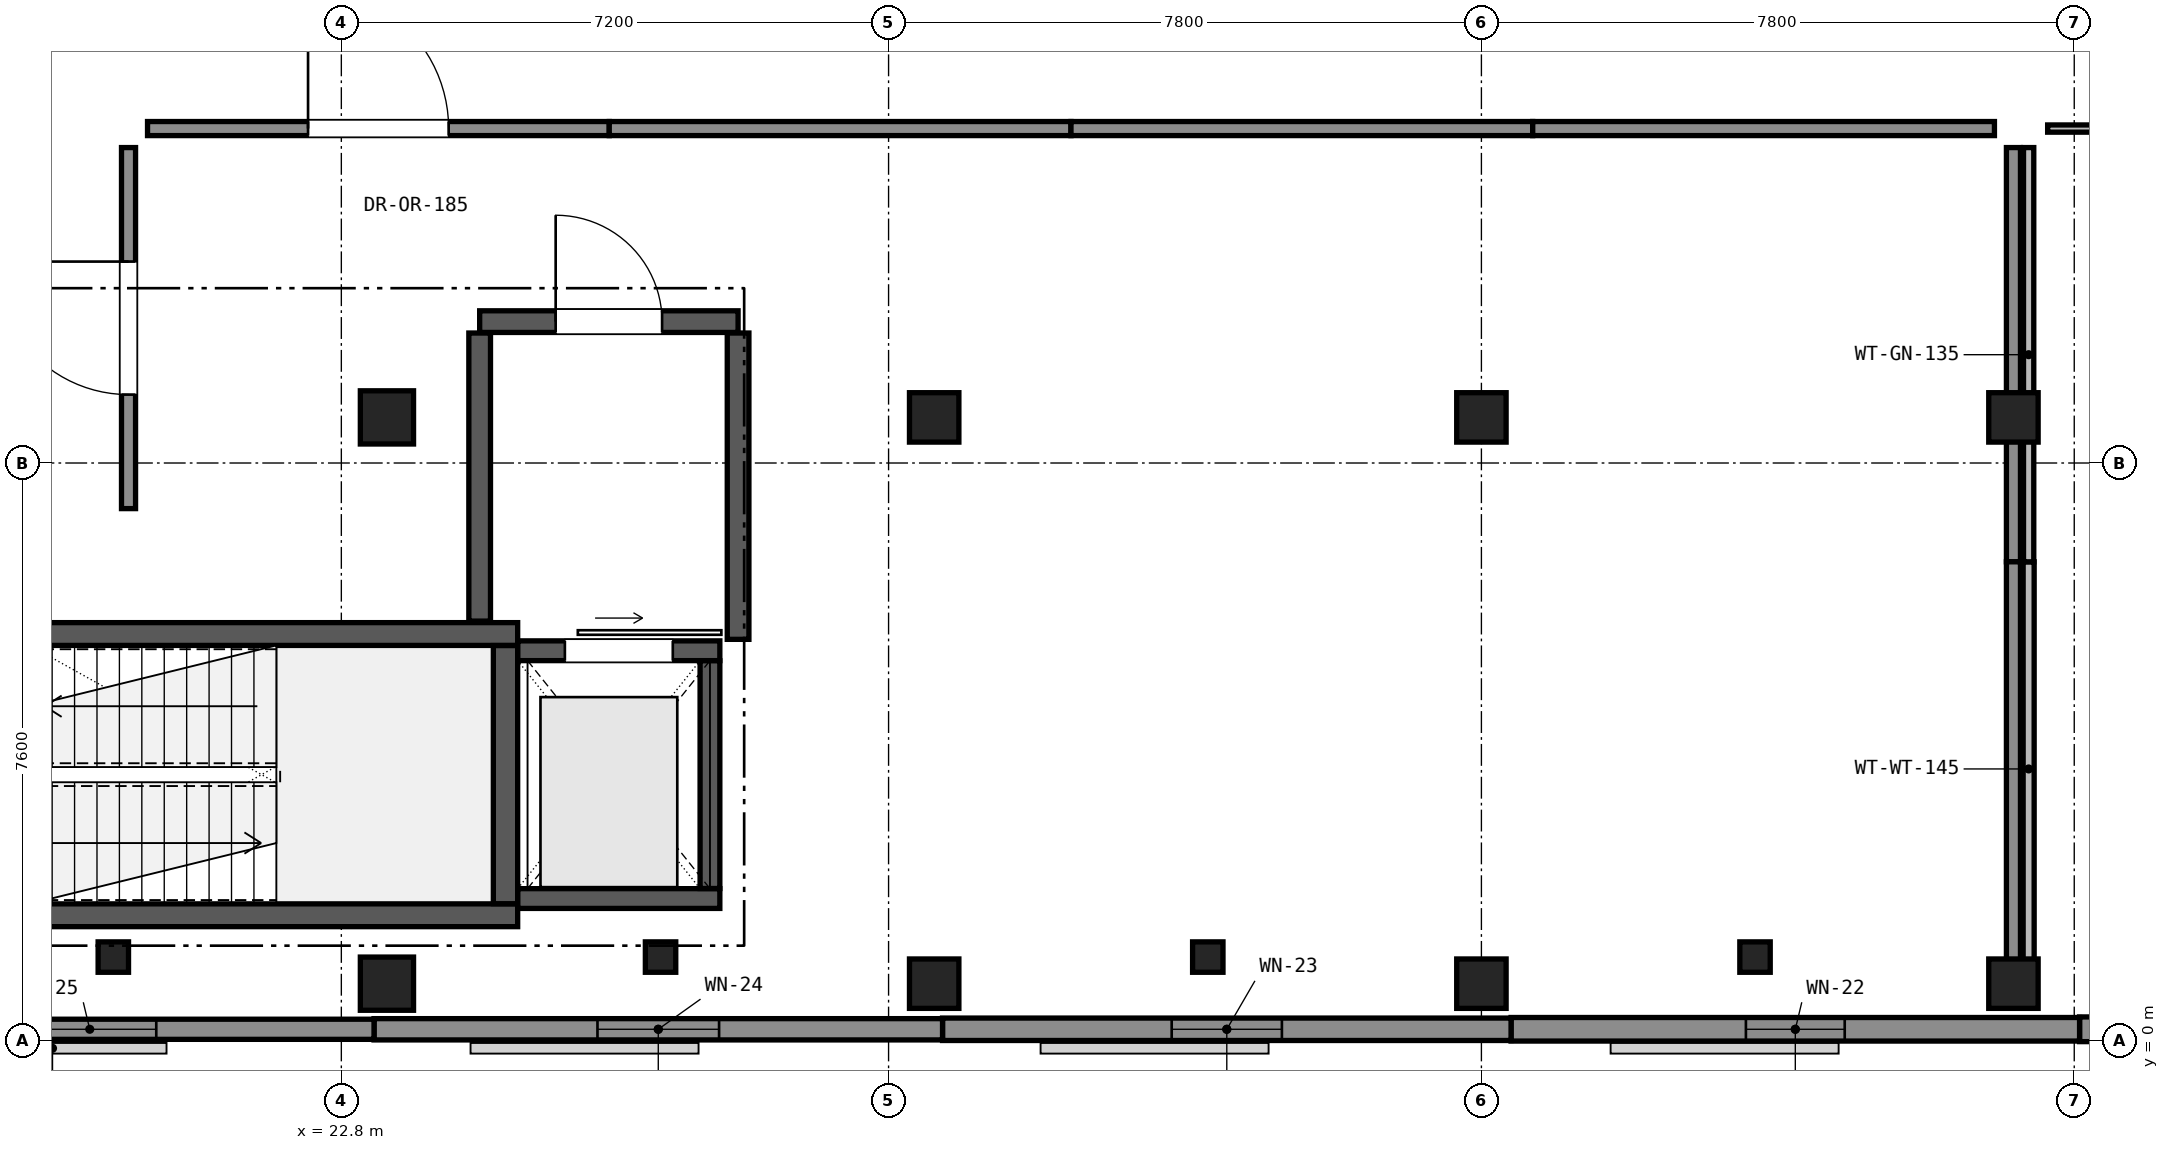
"""IFC4 building model, lengths in metres.
Left out: names, types, materials, properties, quantities, classifications, styles, units other than length and angle.
Written with IfcOpenShell. Run it as: python <this file> out.ifc"""

import sys

from ifc_helpers import new_model, si_unit, direction, frame, frame_2d, origin, origin_2d, place, context, subcontext, project, spatial, rectangle, extrude, element, fill, save


model = new_model("IFC4")
c1 = context("Model", 3, precision=1e-05, world=origin(), true_north=direction((0.0, 1.0)))
c2 = subcontext(c1, "Body", "Model", "MODEL_VIEW")
j1 = project(units=[si_unit("LENGTHUNIT", "METRE"), si_unit("PLANEANGLEUNIT", "RADIAN")], contexts=[c1])
p1 = place(None, origin())
s1 = spatial("IfcSite", under=j1, at=p1, CompositionType="ELEMENT")
p2 = place(p1, origin())
s2 = spatial("IfcBuilding", under=s1, at=p2, CompositionType="ELEMENT")
p3 = place(p2, frame((0.0, 0.0, 9.52)))
s3 = spatial("IfcBuildingStorey", under=s2, at=p3, CompositionType="ELEMENT", Elevation=9.52)
for number, where, z_axis, x_axis in (
    (1, (23.4, 0.75, 0.0), (0.0, 0.0, 1.0), (1.0, 0.0, 0.0)),
    (2, (23.4, 8.2, 0.0), (0.0, 0.0, 1.0), (1.0, 0.0, 0.0)),
):
    element("IfcColumn", number, at=place(p3, frame(where, z_axis=z_axis, x_axis=x_axis)), inside=s3, PredefinedType="COLUMN", context=c2, shape_type="SweptSolid", body=[
        extrude(rectangle(XDim=0.7, YDim=0.7, at=origin_2d()), origin(), (0.0, 0.0, 1.0), 4.08),
    ])
for number, where, z_axis, x_axis in (
    (3, (30.6, 0.75, 0.0), (0.0, 0.0, 1.0), (1.0, 0.0, 0.0)),
    (4, (30.6, 8.2, 0.0), (0.0, 0.0, 1.0), (1.0, 0.0, 0.0)),
    (5, (37.8, 0.75, 0.0), (0.0, 0.0, 1.0), (1.0, 0.0, 0.0)),
    (6, (37.8, 8.2, 0.0), (0.0, 0.0, 1.0), (1.0, 0.0, 0.0)),
    (7, (44.8, 0.75, 0.0), (0.0, 0.0, 1.0), (1.0, 0.0, 0.0)),
    (8, (44.8, 8.2, 0.0), (0.0, 0.0, 1.0), (1.0, 0.0, 0.0)),
):
    element("IfcColumn", number, at=place(p3, frame(where, z_axis=z_axis, x_axis=x_axis)), inside=s3, PredefinedType="COLUMN", context=c2, shape_type="SweptSolid", body=[
        extrude(rectangle(XDim=0.65, YDim=0.65, at=origin_2d()), origin(), (0.0, 0.0, 1.0), 4.08),
    ])
for number, where, z_axis, x_axis in (
    (9, (19.8, 1.1, 0.0), (0.0, 0.0, 1.0), (1.0, 0.0, 0.0)),
    (10, (27.0, 1.1, 0.0), (0.0, 0.0, 1.0), (1.0, 0.0, 0.0)),
    (11, (34.2, 1.1, 0.0), (0.0, 0.0, 1.0), (1.0, 0.0, 0.0)),
    (12, (41.4, 1.1, 0.0), (0.0, 0.0, 1.0), (1.0, 0.0, 0.0)),
):
    element("IfcColumn", number, at=place(p3, frame(where, z_axis=z_axis, x_axis=x_axis)), inside=s3, PredefinedType="PILASTER", context=c2, shape_type="SweptSolid", body=[
        extrude(rectangle(XDim=0.4, YDim=0.4, at=origin_2d()), origin(), (0.0, 0.0, 1.0), 4.08),
    ])
p4 = place(p3, frame((53.15, 0.15, 0.0), z_axis=(0.0, 0.0, 1.0), x_axis=(-1.0, 0.0, 0.0)))
e13 = element("IfcWall", 13, at=p4, inside=s3, PredefinedType="SOLIDWALL", context=c2, shape_type="SweptSolid", body=[
    extrude(rectangle(XDim=7.48, YDim=0.325, at=frame_2d((3.74, 0.0))), origin(), (0.0, 0.0, 1.0), 3.735),
])
p5 = place(p4, frame((3.165, 0.0, 0.9)))
e14 = element("IfcOpeningElement", 14, at=p5, cuts=e13, PredefinedType="OPENING", context=c2, shape_type="SweptSolid", body=[
    extrude(rectangle(XDim=1.15, YDim=2.0, at=frame_2d((0.575, 1.0))), frame((0.0, 0.172, 0.0), z_axis=(0.0, -1.0, 0.0), x_axis=(1.0, 0.0, 0.0)), (0.0, 0.0, 1.0), 0.345),
])
p6 = place(p3, frame((45.67, 0.15, 0.0), z_axis=(0.0, 0.0, 1.0), x_axis=(-1.0, 0.0, 0.0)))
e15 = element("IfcWall", 15, at=p6, inside=s3, PredefinedType="SOLIDWALL", context=c2, shape_type="SweptSolid", body=[
    extrude(rectangle(XDim=7.48, YDim=0.31, at=frame_2d((3.74, 0.0))), origin(), (0.0, 0.0, 1.0), 3.735),
])
p7 = place(p6, frame((3.09, 0.0, 0.9)))
e16 = element("IfcOpeningElement", 16, at=p7, cuts=e15, PredefinedType="OPENING", context=c2, shape_type="SweptSolid", body=[
    extrude(rectangle(XDim=1.3, YDim=2.0, at=frame_2d((0.65, 1.0))), frame((0.0, 0.165, 0.0), z_axis=(0.0, -1.0, 0.0), x_axis=(1.0, 0.0, 0.0)), (0.0, 0.0, 1.0), 0.33),
])
p8 = place(p3, frame((38.19, 0.15, 0.0), z_axis=(0.0, 0.0, 1.0), x_axis=(-1.0, 0.0, 0.0)))
e17 = element("IfcWall", 17, at=p8, inside=s3, PredefinedType="SOLIDWALL", context=c2, shape_type="SweptSolid", body=[
    extrude(rectangle(XDim=7.48, YDim=0.295, at=frame_2d((3.74, 0.0))), origin(), (0.0, 0.0, 1.0), 3.735),
])
p9 = place(p8, frame((3.015, 0.0, 0.9)))
e18 = element("IfcOpeningElement", 18, at=p9, cuts=e17, PredefinedType="OPENING", context=c2, shape_type="SweptSolid", body=[
    extrude(rectangle(XDim=1.45, YDim=2.0, at=frame_2d((0.725, 1.0))), frame((0.0, 0.157, 0.0), z_axis=(0.0, -1.0, 0.0), x_axis=(1.0, 0.0, 0.0)), (0.0, 0.0, 1.0), 0.315),
])
p10 = place(p3, frame((30.71, 0.15, 0.0), z_axis=(0.0, 0.0, 1.0), x_axis=(-1.0, 0.0, 0.0)))
e19 = element("IfcWall", 19, at=p10, inside=s3, PredefinedType="SOLIDWALL", context=c2, shape_type="SweptSolid", body=[
    extrude(rectangle(XDim=7.48, YDim=0.28, at=frame_2d((3.74, 0.0))), origin(), (0.0, 0.0, 1.0), 3.735),
])
p11 = place(p10, frame((2.94, 0.0, 0.9)))
e20 = element("IfcOpeningElement", 20, at=p11, cuts=e19, PredefinedType="OPENING", context=c2, shape_type="SweptSolid", body=[
    extrude(rectangle(XDim=1.6, YDim=2.0, at=frame_2d((0.8, 1.0))), frame((0.0, 0.15, 0.0), z_axis=(0.0, -1.0, 0.0), x_axis=(1.0, 0.0, 0.0)), (0.0, 0.0, 1.0), 0.3),
])
p12 = place(p3, frame((23.23, 0.15, 0.0), z_axis=(0.0, 0.0, 1.0), x_axis=(-1.0, 0.0, 0.0)))
e21 = element("IfcWall", 21, at=p12, inside=s3, PredefinedType="SOLIDWALL", context=c2, shape_type="SweptSolid", body=[
    extrude(rectangle(XDim=7.48, YDim=0.265, at=frame_2d((3.74, 0.0))), origin(), (0.0, 0.0, 1.0), 3.735),
])
p13 = place(p12, frame((2.865, 0.0, 0.9)))
e22 = element("IfcOpeningElement", 22, at=p13, cuts=e21, PredefinedType="OPENING", context=c2, shape_type="SweptSolid", body=[
    extrude(rectangle(XDim=1.75, YDim=2.0, at=frame_2d((0.875, 1.0))), frame((0.0, 0.142, 0.0), z_axis=(0.0, -1.0, 0.0), x_axis=(1.0, 0.0, 0.0)), (0.0, 0.0, 1.0), 0.285),
])
p14 = place(p3, frame((16.7, 1.65, 0.0), z_axis=(0.0, 0.0, 1.0), x_axis=(1.0, 0.0, 0.0)))
e23 = element("IfcWall", 23, at=p14, inside=s3, PredefinedType="SHEAR", context=c2, shape_type="SweptSolid", body=[
    extrude(rectangle(XDim=8.42, YDim=0.3, at=frame_2d((4.21, 0.0))), origin(), (0.0, 0.0, 1.0), 3.735),
])
p15 = place(p3, frame((16.7, 5.35, 0.0), z_axis=(0.0, 0.0, 1.0), x_axis=(1.0, 0.0, 0.0)))
e24 = element("IfcWall", 24, at=p15, inside=s3, PredefinedType="SHEAR", context=c2, shape_type="SweptSolid", body=[
    extrude(rectangle(XDim=8.42, YDim=0.3, at=frame_2d((4.21, 0.0))), origin(), (0.0, 0.0, 1.0), 3.735),
])
p16 = place(p15, frame((0.55, 0.0, 0.0)))
e25 = element("IfcOpeningElement", 25, at=p16, cuts=e24, PredefinedType="OPENING", context=c2, shape_type="SweptSolid", body=[
    extrude(rectangle(XDim=1.2, YDim=2.2, at=frame_2d((0.6, 1.1))), frame((0.0, 0.16, 0.0), z_axis=(0.0, -1.0, 0.0), x_axis=(1.0, 0.0, 0.0)), (0.0, 0.0, 1.0), 0.32),
])
p17 = place(p3, frame((24.96, 1.802, 0.0), z_axis=(0.0, 0.0, 1.0), x_axis=(0.0, 1.0, 0.0)))
e26 = element("IfcWall", 26, at=p17, inside=s3, PredefinedType="SHEAR", context=c2, shape_type="SweptSolid", body=[
    extrude(rectangle(XDim=3.396, YDim=0.32, at=frame_2d((1.698, 0.0))), origin(), (0.0, 0.0, 1.0), 3.735),
])
p18 = place(p3, frame((25.122, 1.87, 0.0), z_axis=(0.0, 0.0, 1.0), x_axis=(1.0, 0.0, 0.0)))
e27 = element("IfcWall", 27, at=p18, inside=s3, PredefinedType="SHEAR", context=c2, shape_type="SweptSolid", body=[
    extrude(rectangle(XDim=2.658, YDim=0.26, at=frame_2d((1.329, 0.0))), origin(), (0.0, 0.0, 1.0), 3.735),
])
p19 = place(p3, frame((25.122, 5.13, 0.0), z_axis=(0.0, 0.0, 1.0), x_axis=(1.0, 0.0, 0.0)))
e28 = element("IfcWall", 28, at=p19, inside=s3, PredefinedType="SHEAR", context=c2, shape_type="SweptSolid", body=[
    extrude(rectangle(XDim=2.658, YDim=0.26, at=frame_2d((1.329, 0.0))), origin(), (0.0, 0.0, 1.0), 3.735),
])
p20 = place(p19, frame((0.619, 0.0, 0.0)))
e29 = element("IfcOpeningElement", 29, at=p20, cuts=e28, PredefinedType="OPENING", context=c2, shape_type="SweptSolid", body=[
    extrude(rectangle(XDim=1.42, YDim=2.25, at=frame_2d((0.71, 1.125))), frame((0.0, 0.14, 0.0), z_axis=(0.0, -1.0, 0.0), x_axis=(1.0, 0.0, 0.0)), (0.0, 0.0, 1.0), 0.28),
])
p21 = place(p3, frame((27.65, 2.002, 0.0), z_axis=(0.0, 0.0, 1.0), x_axis=(0.0, 1.0, 0.0)))
e30 = element("IfcWall", 30, at=p21, inside=s3, PredefinedType="SHEAR", context=c2, shape_type="SweptSolid", body=[
    extrude(rectangle(XDim=2.996, YDim=0.26, at=frame_2d((1.498, 0.0))), origin(), (0.0, 0.0, 1.0), 3.735),
])
p22 = place(p3, frame((24.62, 9.46, 0.0), z_axis=(0.0, 0.0, 1.0), x_axis=(1.0, 0.0, 0.0)))
e31 = element("IfcWall", 31, at=p22, inside=s3, PredefinedType="SHEAR", context=c2, shape_type="SweptSolid", body=[
    extrude(rectangle(XDim=3.4, YDim=0.285, at=frame_2d((1.7, 0.0))), origin(), (0.0, 0.0, 1.0), 3.735),
])
p23 = place(p22, frame((1.0, 0.0, 0.0)))
e32 = element("IfcOpeningElement", 32, at=p23, cuts=e31, PredefinedType="OPENING", context=c2, shape_type="SweptSolid", body=[
    extrude(rectangle(XDim=1.4, YDim=2.25, at=frame_2d((0.7, 1.125))), frame((0.0, 0.152, 0.0), z_axis=(0.0, -1.0, 0.0), x_axis=(1.0, 0.0, 0.0)), (0.0, 0.0, 1.0), 0.305),
])
p24 = place(p3, frame((24.62, 5.52, 0.0), z_axis=(0.0, 0.0, 1.0), x_axis=(0.0, 1.0, 0.0)))
e33 = element("IfcWall", 33, at=p24, inside=s3, PredefinedType="SHEAR", context=c2, shape_type="SweptSolid", body=[
    extrude(rectangle(XDim=3.79, YDim=0.285, at=frame_2d((1.895, 0.0))), origin(), (0.0, 0.0, 1.0), 2.785),
])
p25 = place(p3, frame((28.02, 5.28, 0.0), z_axis=(0.0, 0.0, 1.0), x_axis=(0.0, 1.0, 0.0)))
e34 = element("IfcWall", 34, at=p25, inside=s3, PredefinedType="SHEAR", context=c2, shape_type="SweptSolid", body=[
    extrude(rectangle(XDim=4.03, YDim=0.285, at=frame_2d((2.015, 0.0))), origin(), (0.0, 0.0, 1.0), 2.785),
])
p26 = place(p3, frame((44.8, 11.75, 0.0), z_axis=(0.0, 0.0, 1.0), x_axis=(0.0, -1.0, 0.0)))
e35 = element("IfcWall", 35, at=p26, inside=s3, PredefinedType="PARTITIONING", context=c2, shape_type="SweptSolid", body=[
    extrude(rectangle(XDim=5.45, YDim=0.185, at=frame_2d((2.725, 0.0))), origin(), (0.0, 0.0, 1.0), 2.985),
])
p27 = place(p3, frame((44.8, 6.3, 0.0), z_axis=(0.0, 0.0, 1.0), x_axis=(0.0, -1.0, 0.0)))
e36 = element("IfcWall", 36, at=p27, inside=s3, PredefinedType="PARTITIONING", context=c2, shape_type="SweptSolid", body=[
    extrude(rectangle(XDim=5.45, YDim=0.185, at=frame_2d((2.725, 0.0))), origin(), (0.0, 0.0, 1.0), 3.035),
])
p28 = place(p3, frame((20.0, 7.0, 0.0), z_axis=(0.0, 0.0, 1.0), x_axis=(0.0, 1.0, 0.0)))
e37 = element("IfcWall", 37, at=p28, inside=s3, PredefinedType="PARTITIONING", context=c2, shape_type="SweptSolid", body=[
    extrude(rectangle(XDim=4.75, YDim=0.185, at=frame_2d((2.375, 0.0))), origin(), (0.0, 0.0, 1.0), 2.785),
])
p29 = place(p28, frame((1.5, 0.0, 0.0)))
e38 = element("IfcOpeningElement", 38, at=p29, cuts=e37, PredefinedType="OPENING", context=c2, shape_type="SweptSolid", body=[
    extrude(rectangle(XDim=1.75, YDim=2.4, at=frame_2d((0.875, 1.2))), frame((0.0, 0.103, 0.0), z_axis=(0.0, -1.0, 0.0), x_axis=(1.0, 0.0, 0.0)), (0.0, 0.0, 1.0), 0.205),
])
p30 = place(p3, frame((20.25, 12.0, 0.0), z_axis=(0.0, 0.0, 1.0), x_axis=(1.0, 0.0, 0.0)))
e39 = element("IfcWall", 39, at=p30, inside=s3, PredefinedType="PARTITIONING", context=c2, shape_type="SweptSolid", body=[
    extrude(rectangle(XDim=6.075, YDim=0.185, at=frame_2d((3.038, 0.0))), origin(), (0.0, 0.0, 1.0), 3.035),
])
p31 = place(p30, frame((2.112, 0.0, 0.0)))
e40 = element("IfcOpeningElement", 40, at=p31, cuts=e39, PredefinedType="OPENING", context=c2, shape_type="SweptSolid", body=[
    extrude(rectangle(XDim=1.85, YDim=2.4, at=frame_2d((0.925, 1.2))), frame((0.0, 0.103, 0.0), z_axis=(0.0, -1.0, 0.0), x_axis=(1.0, 0.0, 0.0)), (0.0, 0.0, 1.0), 0.205),
])
p32 = place(p3, frame((26.325, 12.0, 0.0), z_axis=(0.0, 0.0, 1.0), x_axis=(1.0, 0.0, 0.0)))
e41 = element("IfcWall", 41, at=p32, inside=s3, PredefinedType="PARTITIONING", context=c2, shape_type="SweptSolid", body=[
    extrude(rectangle(XDim=6.075, YDim=0.185, at=frame_2d((3.038, 0.0))), origin(), (0.0, 0.0, 1.0), 3.185),
])
p33 = place(p3, frame((32.4, 12.0, 0.0), z_axis=(0.0, 0.0, 1.0), x_axis=(1.0, 0.0, 0.0)))
e42 = element("IfcWall", 42, at=p33, inside=s3, PredefinedType="PARTITIONING", context=c2, shape_type="SweptSolid", body=[
    extrude(rectangle(XDim=6.075, YDim=0.185, at=frame_2d((3.038, 0.0))), origin(), (0.0, 0.0, 1.0), 3.085),
])
p34 = place(p3, frame((38.475, 12.0, 0.0), z_axis=(0.0, 0.0, 1.0), x_axis=(1.0, 0.0, 0.0)))
e43 = element("IfcWall", 43, at=p34, inside=s3, PredefinedType="PARTITIONING", context=c2, shape_type="SweptSolid", body=[
    extrude(rectangle(XDim=6.075, YDim=0.185, at=frame_2d((3.038, 0.0))), origin(), (0.0, 0.0, 1.0), 2.985),
])
p35 = place(p3, frame((45.25, 12.0, 0.0), z_axis=(0.0, 0.0, 1.0), x_axis=(1.0, 0.0, 0.0)))
e44 = element("IfcWall", 44, at=p35, inside=s3, PredefinedType="PARTITIONING", context=c2, shape_type="SweptSolid", body=[
    extrude(rectangle(XDim=7.3, YDim=0.095, at=frame_2d((3.65, 0.0))), origin(), (0.0, 0.0, 1.0), 3.135),
])
p36 = place(p35, frame((3.21, 0.0, 0.0)))
e45 = element("IfcOpeningElement", 45, at=p36, cuts=e44, PredefinedType="OPENING", context=c2, shape_type="SweptSolid", body=[
    extrude(rectangle(XDim=0.88, YDim=2.1, at=frame_2d((0.44, 1.05))), frame((0.0, 0.057, 0.0), z_axis=(0.0, -1.0, 0.0), x_axis=(1.0, 0.0, 0.0)), (0.0, 0.0, 1.0), 0.115),
])
p37 = place(p3, frame((45.0, 0.85, 0.0), z_axis=(0.0, 0.0, 1.0), x_axis=(0.0, 1.0, 0.0)))
e46 = element("IfcWall", 46, at=p37, inside=s3, PredefinedType="PARTITIONING", context=c2, shape_type="SweptSolid", body=[
    extrude(rectangle(XDim=5.45, YDim=0.145, at=frame_2d((2.725, 0.0))), origin(), (0.0, 0.0, 1.0), 3.035),
])
p38 = place(p3, frame((45.0, 6.3, 0.0), z_axis=(0.0, 0.0, 1.0), x_axis=(0.0, 1.0, 0.0)))
e47 = element("IfcWall", 47, at=p38, inside=s3, PredefinedType="PARTITIONING", context=c2, shape_type="SweptSolid", body=[
    extrude(rectangle(XDim=5.45, YDim=0.135, at=frame_2d((2.725, 0.0))), origin(), (0.0, 0.0, 1.0), 2.985),
])
p39 = place(p7, origin())
e48 = element("IfcWindow", 48, at=p39, inside=s3, PartitioningType="SINGLE_PANEL", PredefinedType="WINDOW", context=c2, shape_type="SweptSolid", body=[
    extrude(rectangle(XDim=1.3, YDim=2.0, at=frame_2d((0.65, 1.0))), frame((0.0, 0.03, 0.0), z_axis=(0.0, -1.0, 0.0), x_axis=(1.0, 0.0, 0.0)), (0.0, 0.0, 1.0), 0.06),
])
fill(e16, e48)
p40 = place(p9, origin())
e49 = element("IfcWindow", 49, at=p40, inside=s3, PartitioningType="SINGLE_PANEL", PredefinedType="WINDOW", context=c2, shape_type="SweptSolid", body=[
    extrude(rectangle(XDim=1.45, YDim=2.0, at=frame_2d((0.725, 1.0))), frame((0.0, 0.03, 0.0), z_axis=(0.0, -1.0, 0.0), x_axis=(1.0, 0.0, 0.0)), (0.0, 0.0, 1.0), 0.06),
])
fill(e18, e49)
p41 = place(p11, origin())
e50 = element("IfcWindow", 50, at=p41, inside=s3, PartitioningType="SINGLE_PANEL", PredefinedType="WINDOW", context=c2, shape_type="SweptSolid", body=[
    extrude(rectangle(XDim=1.6, YDim=2.0, at=frame_2d((0.8, 1.0))), frame((0.0, 0.03, 0.0), z_axis=(0.0, -1.0, 0.0), x_axis=(1.0, 0.0, 0.0)), (0.0, 0.0, 1.0), 0.06),
])
fill(e20, e50)
p42 = place(p13, origin())
e51 = element("IfcWindow", 51, at=p42, inside=s3, PartitioningType="SINGLE_PANEL", PredefinedType="WINDOW", context=c2, shape_type="SweptSolid", body=[
    extrude(rectangle(XDim=1.75, YDim=2.0, at=frame_2d((0.875, 1.0))), frame((0.0, 0.03, 0.0), z_axis=(0.0, -1.0, 0.0), x_axis=(1.0, 0.0, 0.0)), (0.0, 0.0, 1.0), 0.06),
])
fill(e22, e51)
p43 = place(p20, origin())
e52 = element("IfcDoor", 52, at=p43, inside=s3, OperationType="SLIDING_TO_RIGHT", PredefinedType="DOOR", context=c2, shape_type="SweptSolid", body=[
    extrude(rectangle(XDim=1.42, YDim=2.25, at=frame_2d((0.71, 1.125))), frame((0.0, 0.025, 0.0), z_axis=(0.0, -1.0, 0.0), x_axis=(1.0, 0.0, 0.0)), (0.0, 0.0, 1.0), 0.05),
])
fill(e29, e52)
p44 = place(p23, origin())
e53 = element("IfcDoor", 53, at=p44, inside=s3, OperationType="SINGLE_SWING_LEFT", PredefinedType="DOOR", context=c2, shape_type="SweptSolid", body=[
    extrude(rectangle(XDim=1.4, YDim=2.25, at=frame_2d((0.7, 1.125))), frame((0.0, 0.025, 0.0), z_axis=(0.0, -1.0, 0.0), x_axis=(1.0, 0.0, 0.0)), (0.0, 0.0, 1.0), 0.05),
])
fill(e32, e53)
p45 = place(p29, origin())
e54 = element("IfcDoor", 54, at=p45, inside=s3, OperationType="SINGLE_SWING_RIGHT", PredefinedType="DOOR", context=c2, shape_type="SweptSolid", body=[
    extrude(rectangle(XDim=1.75, YDim=2.4, at=frame_2d((0.875, 1.2))), frame((0.0, 0.025, 0.0), z_axis=(0.0, -1.0, 0.0), x_axis=(1.0, 0.0, 0.0)), (0.0, 0.0, 1.0), 0.05),
])
fill(e38, e54)
p46 = place(p31, origin())
e55 = element("IfcDoor", 55, at=p46, inside=s3, OperationType="SINGLE_SWING_LEFT", PredefinedType="DOOR", context=c2, shape_type="SweptSolid", body=[
    extrude(rectangle(XDim=1.85, YDim=2.4, at=frame_2d((0.925, 1.2))), frame((0.0, 0.025, 0.0), z_axis=(0.0, -1.0, 0.0), x_axis=(1.0, 0.0, 0.0)), (0.0, 0.0, 1.0), 0.05),
])
fill(e40, e55)
save(model, sys.argv[1])
